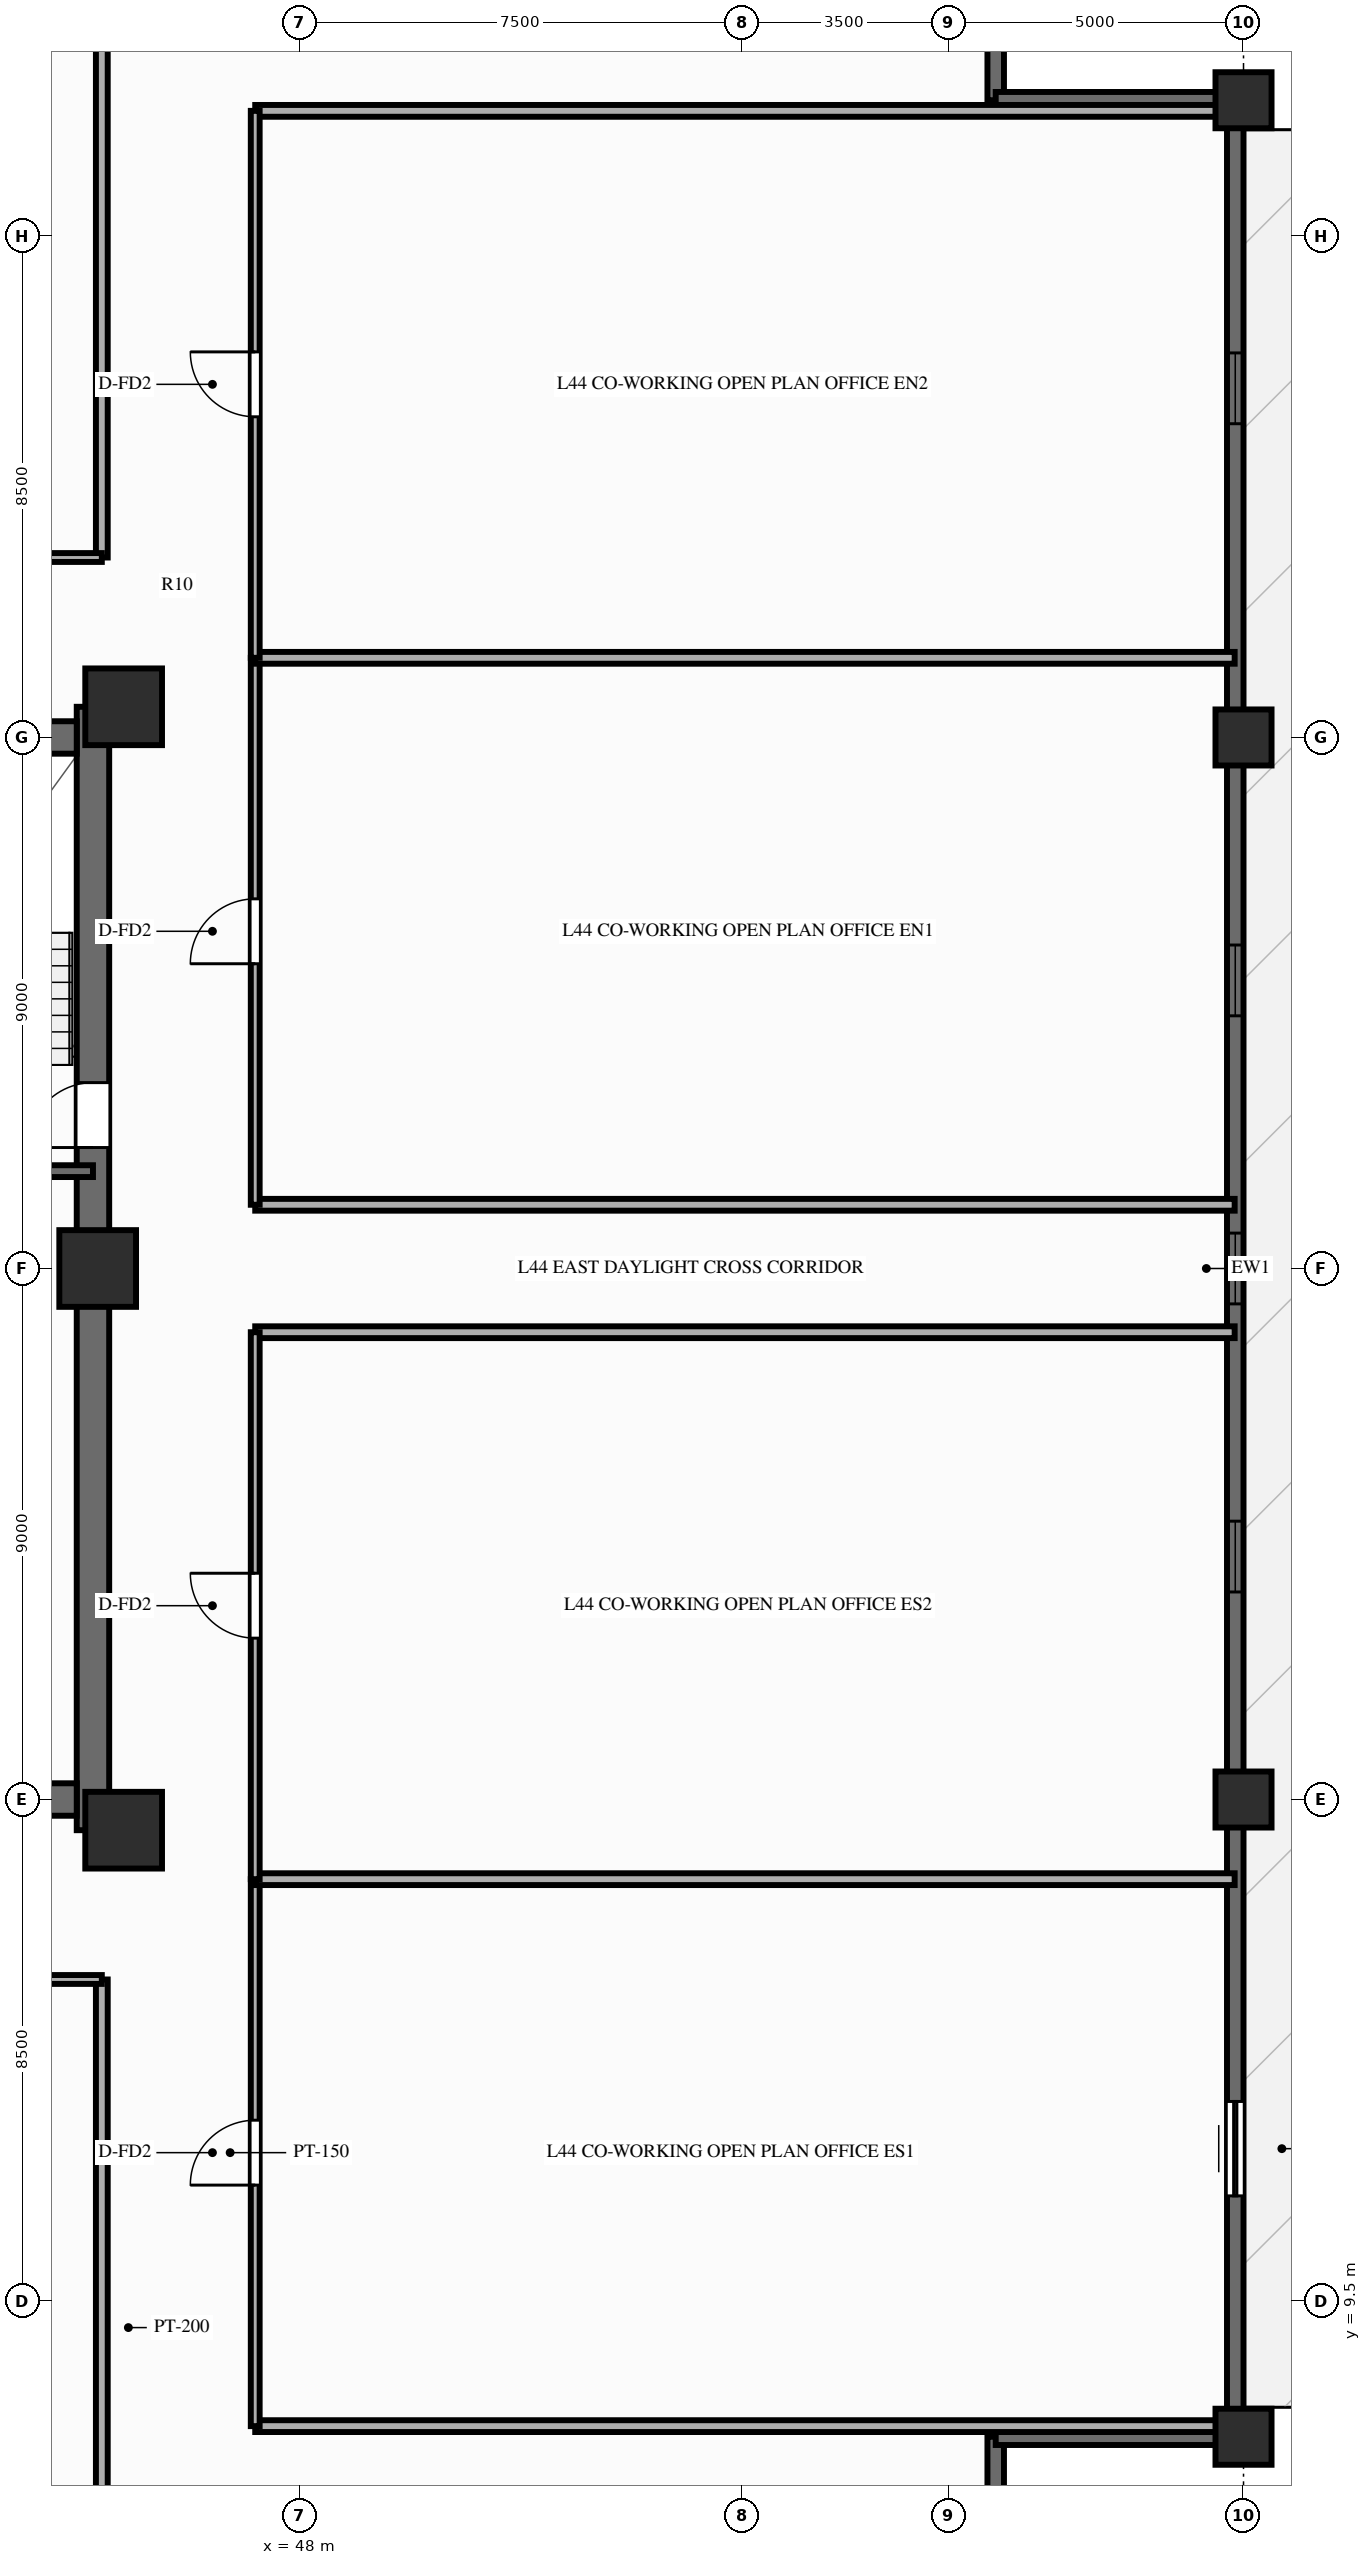
"""IFC4 building model, lengths in metres.
Left out: names, types, materials, properties, quantities, classifications, styles, units other than length and angle.
Written with IfcOpenShell. Run it as: python <this file> out.ifc"""

import sys

from ifc_helpers import new_model, si_unit, direction, frame, frame_2d, origin, origin_2d, place, context, subcontext, project, spatial, rectangle, extrude, source, transform, mapped, element, fill, save


model = new_model("IFC4")
c1 = context("Model", 3, precision=1e-05, world=origin(), true_north=direction((0.0, 1.0)))
c2 = subcontext(c1, "Body", "Model", "MODEL_VIEW")
j1 = project(units=[si_unit("LENGTHUNIT", "METRE"), si_unit("PLANEANGLEUNIT", "RADIAN")], contexts=[c1])
p1 = place(None, origin())
s1 = spatial("IfcSite", under=j1, at=p1, CompositionType="ELEMENT")
p2 = place(p1, origin())
s2 = spatial("IfcBuilding", under=s1, at=p2, CompositionType="ELEMENT")
p3 = place(p2, frame((0.0, 0.0, 138.75)))
s3 = spatial("IfcBuildingStorey", under=s2, at=p3, CompositionType="ELEMENT", Elevation=138.75)
p4 = place(p3, frame((44.5, 17.48, 0.0), z_axis=(0.0, 0.0, 1.0), x_axis=(0.0, 1.0, 0.0)))
e1 = element("IfcWall", 1, at=p4, inside=s3, PredefinedType="SHEAR", context=c2, shape_type="SweptSolid", body=[
    extrude(rectangle(XDim=19.04, YDim=0.55, at=frame_2d((9.52, 0.0))), origin(), (0.0, 0.0, 1.0), 3.0),
])
p5 = place(p4, frame((12.67, 0.0, 0.0), z_axis=(0.0, 0.0, 1.0), x_axis=(-1.0, 0.0, 0.0)))
e2 = element("IfcOpeningElement", 2, at=p5, cuts=e1, PredefinedType="OPENING", context=c2, shape_type="SweptSolid", body=[
    extrude(rectangle(XDim=1.1, YDim=2.15, at=frame_2d((0.55, 1.075))), frame((0.0, 0.287, 0.0), z_axis=(0.0, -1.0, 0.0), x_axis=(1.0, 0.0, 0.0)), (0.0, 0.0, 1.0), 0.574),
])
p6 = place(p3, frame((31.775, 18.0, 0.0), z_axis=(0.0, 0.0, 1.0), x_axis=(1.0, 0.0, 0.0)))
e3 = element("IfcWall", 3, at=p6, inside=s3, PredefinedType="SHEAR", context=c2, shape_type="SweptSolid", body=[
    extrude(rectangle(XDim=12.45, YDim=0.55, at=frame_2d((6.225, 0.0))), origin(), (0.0, 0.0, 1.0), 3.0),
])
p7 = place(p3, frame((31.775, 36.0, 0.0), z_axis=(0.0, 0.0, 1.0), x_axis=(1.0, 0.0, 0.0)))
e4 = element("IfcWall", 4, at=p7, inside=s3, PredefinedType="SHEAR", context=c2, shape_type="SweptSolid", body=[
    extrude(rectangle(XDim=12.45, YDim=0.55, at=frame_2d((6.225, 0.0))), origin(), (0.0, 0.0, 1.0), 3.0),
])
p8 = place(p7, frame((5.175, 0.0, 0.0), z_axis=(0.0, 0.0, 1.0), x_axis=(-1.0, 0.0, 0.0)))
e5 = element("IfcOpeningElement", 5, at=p8, cuts=e4, PredefinedType="OPENING", context=c2, shape_type="SweptSolid", body=[
    extrude(rectangle(XDim=1.4, YDim=2.15, at=frame_2d((0.7, 1.075))), frame((0.0, 0.287, 0.0), z_axis=(0.0, -1.0, 0.0), x_axis=(1.0, 0.0, 0.0)), (0.0, 0.0, 1.0), 0.574),
])
m1 = source(origin(), c2, "Body", "SweptSolid", [
    extrude(rectangle(XDim=1.3, YDim=1.3, at=origin_2d()), origin(), (0.0, 0.0, 1.0), 3.0),
])
for number, where, z_axis, x_axis in (
    (6, (45.02, 17.48, 0.0), (0.0, 0.0, 1.0), (1.0, 0.0, 0.0)),
    (7, (45.02, 36.52, 0.0), (0.0, 0.0, 1.0), (1.0, 0.0, 0.0)),
    (8, (44.58, 27.0, 0.0), (0.0, 0.0, 1.0), (1.0, 0.0, 0.0)),
):
    element("IfcColumn", number, at=place(p3, frame(where, z_axis=z_axis, x_axis=x_axis)), inside=s3, PredefinedType="COLUMN", context=c2, shape_type="MappedRepresentation", body=[
        mapped(m1, transform((0.0, 0.0, 0.0), scale=1.0)),
    ])
m2 = source(origin(), c2, "Body", "SweptSolid", [
    extrude(rectangle(XDim=0.95, YDim=0.95, at=origin_2d()), origin(), (0.0, 0.0, 1.0), 3.0),
])
for number, where, z_axis, x_axis in (
    (9, (64.0, 7.2, 0.0), (0.0, 0.0, 1.0), (1.0, 0.0, 0.0)),
    (10, (64.0, 18.0, 0.0), (0.0, 0.0, 1.0), (1.0, 0.0, 0.0)),
    (11, (64.0, 36.0, 0.0), (0.0, 0.0, 1.0), (1.0, 0.0, 0.0)),
    (12, (64.0, 46.8, 0.0), (0.0, 0.0, 1.0), (1.0, 0.0, 0.0)),
):
    element("IfcColumn", number, at=place(p3, frame(where, z_axis=z_axis, x_axis=x_axis)), inside=s3, PredefinedType="COLUMN", context=c2, shape_type="MappedRepresentation", body=[
        mapped(m2, transform((0.0, 0.0, 0.0), scale=1.0)),
    ])
p9 = place(p3, frame((63.86, 7.2, 0.0), z_axis=(0.0, 0.0, 1.0), x_axis=(0.0, 1.0, 0.0)))
e13 = element("IfcWall", 13, at=p9, inside=s3, PredefinedType="SOLIDWALL", context=c2, shape_type="SweptSolid", body=[
    extrude(rectangle(XDim=39.6, YDim=0.28, at=frame_2d((19.8, 0.0))), origin(), (0.0, 0.0, 1.0), 2.28),
])
p10 = place(p9, frame((5.683, 0.0, 0.0), z_axis=(0.0, 0.0, 1.0), x_axis=(-1.0, 0.0, 0.0)))
e14 = element("IfcOpeningElement", 14, at=p10, cuts=e13, PredefinedType="OPENING", context=c2, shape_type="SweptSolid", body=[
    extrude(rectangle(XDim=1.6, YDim=2.15, at=frame_2d((0.8, 1.075))), frame((0.0, 0.152, 0.0), z_axis=(0.0, -1.0, 0.0), x_axis=(1.0, 0.0, 0.0)), (0.0, 0.0, 1.0), 0.304),
])
p11 = place(p9, frame((14.317, 0.0, 0.25)))
e15 = element("IfcOpeningElement", 15, at=p11, cuts=e13, PredefinedType="OPENING", context=c2, shape_type="SweptSolid", body=[
    extrude(rectangle(XDim=1.2, YDim=1.5, at=frame_2d((0.6, 0.75))), frame((0.0, 0.152, 0.0), z_axis=(0.0, -1.0, 0.0), x_axis=(1.0, 0.0, 0.0)), (0.0, 0.0, 1.0), 0.304),
])
p12 = place(p9, frame((19.2, 0.0, 0.25)))
e16 = element("IfcOpeningElement", 16, at=p12, cuts=e13, PredefinedType="OPENING", context=c2, shape_type="SweptSolid", body=[
    extrude(rectangle(XDim=1.2, YDim=1.5, at=frame_2d((0.6, 0.75))), frame((0.0, 0.152, 0.0), z_axis=(0.0, -1.0, 0.0), x_axis=(1.0, 0.0, 0.0)), (0.0, 0.0, 1.0), 0.304),
])
p13 = place(p9, frame((24.083, 0.0, 0.25)))
e17 = element("IfcOpeningElement", 17, at=p13, cuts=e13, PredefinedType="OPENING", context=c2, shape_type="SweptSolid", body=[
    extrude(rectangle(XDim=1.2, YDim=1.5, at=frame_2d((0.6, 0.75))), frame((0.0, 0.152, 0.0), z_axis=(0.0, -1.0, 0.0), x_axis=(1.0, 0.0, 0.0)), (0.0, 0.0, 1.0), 0.304),
])
p14 = place(p9, frame((34.117, 0.0, 0.25)))
e18 = element("IfcOpeningElement", 18, at=p14, cuts=e13, PredefinedType="OPENING", context=c2, shape_type="SweptSolid", body=[
    extrude(rectangle(XDim=1.2, YDim=1.5, at=frame_2d((0.6, 0.75))), frame((0.0, 0.152, 0.0), z_axis=(0.0, -1.0, 0.0), x_axis=(1.0, 0.0, 0.0)), (0.0, 0.0, 1.0), 0.304),
])
for number, where, z_axis, x_axis in (
    (19, (59.8, 3.08, 0.0), (0.0, 0.0, 1.0), (0.0, 1.0, 0.0)),
    (20, (59.8, 7.2, 0.0), (0.0, 0.0, 1.0), (1.0, 0.0, 0.0)),
    (21, (59.8, 46.8, 0.0), (0.0, 0.0, 1.0), (0.0, 1.0, 0.0)),
    (22, (59.8, 46.8, 0.0), (0.0, 0.0, 1.0), (1.0, 0.0, 0.0)),
):
    element("IfcWall", number, at=place(p3, frame(where, z_axis=z_axis, x_axis=x_axis)), inside=s3, PredefinedType="SOLIDWALL", context=c2, shape_type="SweptSolid", body=[
        extrude(rectangle(XDim=4.12, YDim=0.28, at=frame_2d((2.06, 0.0))), origin(), (0.0, 0.0, 1.0), 2.28),
    ])
p15 = place(p3, frame((40.57, 28.65, 0.0), z_axis=(0.0, 0.0, 1.0), x_axis=(1.0, 0.0, 0.0)))
e23 = element("IfcWall", 23, at=p15, inside=s3, PredefinedType="SOLIDWALL", context=c2, shape_type="SweptSolid", body=[
    extrude(rectangle(XDim=3.93, YDim=0.2, at=frame_2d((1.965, 0.0))), origin(), (0.0, 0.0, 1.0), 2.79),
])
p16 = place(p3, frame((44.65, 14.95, 0.0), z_axis=(0.0, 0.0, 1.0), x_axis=(0.0, -1.0, 0.0)))
e24 = element("IfcWall", 24, at=p16, inside=s3, PredefinedType="PARTITIONING", context=c2, shape_type="SweptSolid", body=[
    extrude(rectangle(XDim=11.8, YDim=0.2, at=frame_2d((5.9, 0.0))), origin(), (0.0, 0.0, 1.0), 2.34),
])
p17 = place(p3, frame((36.25, 14.95, 0.0), z_axis=(0.0, 0.0, 1.0), x_axis=(1.0, 0.0, 0.0)))
e25 = element("IfcWall", 25, at=p17, inside=s3, PredefinedType="PARTITIONING", context=c2, shape_type="SweptSolid", body=[
    extrude(rectangle(XDim=8.4, YDim=0.15, at=frame_2d((4.2, 0.0))), origin(), (0.0, 0.0, 1.0), 2.79),
])
p18 = place(p17, frame((3.367, 0.0, 0.0)))
e26 = element("IfcOpeningElement", 26, at=p18, cuts=e25, PredefinedType="OPENING", context=c2, shape_type="SweptSolid", body=[
    extrude(rectangle(XDim=1.1, YDim=2.15, at=frame_2d((0.55, 1.075))), frame((0.0, 0.087, 0.0), z_axis=(0.0, -1.0, 0.0), x_axis=(1.0, 0.0, 0.0)), (0.0, 0.0, 1.0), 0.174),
])
p19 = place(p3, frame((44.65, 39.05, 0.0), z_axis=(0.0, 0.0, 1.0), x_axis=(0.0, 1.0, 0.0)))
e27 = element("IfcWall", 27, at=p19, inside=s3, PredefinedType="PARTITIONING", context=c2, shape_type="SweptSolid", body=[
    extrude(rectangle(XDim=11.8, YDim=0.2, at=frame_2d((5.9, 0.0))), origin(), (0.0, 0.0, 1.0), 2.34),
])
p20 = place(p3, frame((38.629, 39.05, 0.0), z_axis=(0.0, 0.0, 1.0), x_axis=(1.0, 0.0, 0.0)))
e28 = element("IfcWall", 28, at=p20, inside=s3, PredefinedType="PARTITIONING", context=c2, shape_type="SweptSolid", body=[
    extrude(rectangle(XDim=6.021, YDim=0.15, at=frame_2d((3.01, 0.0))), origin(), (0.0, 0.0, 1.0), 2.79),
])
p21 = place(p20, frame((2.46, 0.0, 0.0)))
e29 = element("IfcOpeningElement", 29, at=p21, cuts=e28, PredefinedType="OPENING", context=c2, shape_type="SweptSolid", body=[
    extrude(rectangle(XDim=1.1, YDim=2.15, at=frame_2d((0.55, 1.075))), frame((0.0, 0.087, 0.0), z_axis=(0.0, -1.0, 0.0), x_axis=(1.0, 0.0, 0.0)), (0.0, 0.0, 1.0), 0.174),
])
for number, where, z_axis, x_axis in (
    (30, (47.25, 7.38, 0.0), (0.0, 0.0, 1.0), (1.0, 0.0, 0.0)),
    (31, (47.25, 25.92, 0.0), (0.0, 0.0, 1.0), (1.0, 0.0, 0.0)),
):
    element("IfcWall", number, at=place(p3, frame(where, z_axis=z_axis, x_axis=x_axis)), inside=s3, PredefinedType="PARTITIONING", context=c2, shape_type="SweptSolid", body=[
        extrude(rectangle(XDim=16.6, YDim=0.2, at=frame_2d((8.3, 0.0))), origin(), (0.0, 0.0, 1.0), 2.79),
    ])
p22 = place(p3, frame((47.25, 7.38, 0.0), z_axis=(0.0, 0.0, 1.0), x_axis=(0.0, 1.0, 0.0)))
e32 = element("IfcWall", 32, at=p22, inside=s3, PredefinedType="PARTITIONING", context=c2, shape_type="SweptSolid", body=[
    extrude(rectangle(XDim=9.27, YDim=0.15, at=frame_2d((4.635, 0.0))), origin(), (0.0, 0.0, 1.0), 2.79),
])
p23 = place(p22, frame((4.085, 0.0, 0.0)))
e33 = element("IfcOpeningElement", 33, at=p23, cuts=e32, PredefinedType="OPENING", context=c2, shape_type="SweptSolid", body=[
    extrude(rectangle(XDim=1.1, YDim=2.15, at=frame_2d((0.55, 1.075))), frame((0.0, 0.087, 0.0), z_axis=(0.0, -1.0, 0.0), x_axis=(1.0, 0.0, 0.0)), (0.0, 0.0, 1.0), 0.174),
])
p24 = place(p3, frame((47.25, 16.65, 0.0), z_axis=(0.0, 0.0, 1.0), x_axis=(1.0, 0.0, 0.0)))
e34 = element("IfcWall", 34, at=p24, inside=s3, PredefinedType="PARTITIONING", context=c2, shape_type="SweptSolid", body=[
    extrude(rectangle(XDim=16.6, YDim=0.2, at=frame_2d((8.3, 0.0))), origin(), (0.0, 0.0, 1.0), 2.79),
])
p25 = place(p3, frame((47.25, 16.65, 0.0), z_axis=(0.0, 0.0, 1.0), x_axis=(0.0, 1.0, 0.0)))
e35 = element("IfcWall", 35, at=p25, inside=s3, PredefinedType="PARTITIONING", context=c2, shape_type="SweptSolid", body=[
    extrude(rectangle(XDim=9.27, YDim=0.15, at=frame_2d((4.635, 0.0))), origin(), (0.0, 0.0, 1.0), 2.79),
])
p26 = place(p25, frame((4.085, 0.0, 0.0)))
e36 = element("IfcOpeningElement", 36, at=p26, cuts=e35, PredefinedType="OPENING", context=c2, shape_type="SweptSolid", body=[
    extrude(rectangle(XDim=1.1, YDim=2.15, at=frame_2d((0.55, 1.075))), frame((0.0, 0.087, 0.0), z_axis=(0.0, -1.0, 0.0), x_axis=(1.0, 0.0, 0.0)), (0.0, 0.0, 1.0), 0.174),
])
for number, where, z_axis, x_axis in (
    (37, (47.25, 28.08, 0.0), (0.0, 0.0, 1.0), (1.0, 0.0, 0.0)),
    (38, (47.25, 46.62, 0.0), (0.0, 0.0, 1.0), (1.0, 0.0, 0.0)),
):
    element("IfcWall", number, at=place(p3, frame(where, z_axis=z_axis, x_axis=x_axis)), inside=s3, PredefinedType="PARTITIONING", context=c2, shape_type="SweptSolid", body=[
        extrude(rectangle(XDim=16.6, YDim=0.2, at=frame_2d((8.3, 0.0))), origin(), (0.0, 0.0, 1.0), 2.79),
    ])
p27 = place(p3, frame((47.25, 28.08, 0.0), z_axis=(0.0, 0.0, 1.0), x_axis=(0.0, 1.0, 0.0)))
e39 = element("IfcWall", 39, at=p27, inside=s3, PredefinedType="PARTITIONING", context=c2, shape_type="SweptSolid", body=[
    extrude(rectangle(XDim=9.27, YDim=0.15, at=frame_2d((4.635, 0.0))), origin(), (0.0, 0.0, 1.0), 2.79),
])
p28 = place(p27, frame((4.085, 0.0, 0.0)))
e40 = element("IfcOpeningElement", 40, at=p28, cuts=e39, PredefinedType="OPENING", context=c2, shape_type="SweptSolid", body=[
    extrude(rectangle(XDim=1.1, YDim=2.15, at=frame_2d((0.55, 1.075))), frame((0.0, 0.087, 0.0), z_axis=(0.0, -1.0, 0.0), x_axis=(1.0, 0.0, 0.0)), (0.0, 0.0, 1.0), 0.174),
])
p29 = place(p3, frame((47.25, 37.35, 0.0), z_axis=(0.0, 0.0, 1.0), x_axis=(1.0, 0.0, 0.0)))
e41 = element("IfcWall", 41, at=p29, inside=s3, PredefinedType="PARTITIONING", context=c2, shape_type="SweptSolid", body=[
    extrude(rectangle(XDim=16.6, YDim=0.2, at=frame_2d((8.3, 0.0))), origin(), (0.0, 0.0, 1.0), 2.79),
])
p30 = place(p3, frame((47.25, 37.35, 0.0), z_axis=(0.0, 0.0, 1.0), x_axis=(0.0, 1.0, 0.0)))
e42 = element("IfcWall", 42, at=p30, inside=s3, PredefinedType="PARTITIONING", context=c2, shape_type="SweptSolid", body=[
    extrude(rectangle(XDim=9.27, YDim=0.15, at=frame_2d((4.635, 0.0))), origin(), (0.0, 0.0, 1.0), 2.79),
])
p31 = place(p30, frame((4.085, 0.0, 0.0)))
e43 = element("IfcOpeningElement", 43, at=p31, cuts=e42, PredefinedType="OPENING", context=c2, shape_type="SweptSolid", body=[
    extrude(rectangle(XDim=1.1, YDim=2.15, at=frame_2d((0.55, 1.075))), frame((0.0, 0.087, 0.0), z_axis=(0.0, -1.0, 0.0), x_axis=(1.0, 0.0, 0.0)), (0.0, 0.0, 1.0), 0.174),
])
m3 = source(origin(), c2, "Body", "SweptSolid", [
    extrude(rectangle(XDim=1.6, YDim=2.15, at=frame_2d((0.8, 1.075))), frame((0.0, 0.025, 0.0), z_axis=(0.0, -1.0, 0.0), x_axis=(1.0, 0.0, 0.0)), (0.0, 0.0, 1.0), 0.05),
])
p32 = place(p10, origin())
e44 = element("IfcDoor", 44, at=p32, inside=s3, OperationType="SLIDING_TO_LEFT", PredefinedType="DOOR", context=c2, shape_type="MappedRepresentation", body=[
    mapped(m3, transform((0.0, 0.0, 0.0), scale=1.0)),
])
fill(e14, e44)
m4 = source(origin(), c2, "Body", "SweptSolid", [
    extrude(rectangle(XDim=1.2, YDim=1.5, at=frame_2d((0.6, 0.75))), frame((0.0, 0.03, 0.0), z_axis=(0.0, -1.0, 0.0), x_axis=(1.0, 0.0, 0.0)), (0.0, 0.0, 1.0), 0.06),
])
p33 = place(p11, origin())
e45 = element("IfcWindow", 45, at=p33, inside=s3, PartitioningType="SINGLE_PANEL", PredefinedType="WINDOW", context=c2, shape_type="MappedRepresentation", body=[
    mapped(m4, transform((0.0, 0.0, 0.0), scale=1.0)),
])
fill(e15, e45)
p34 = place(p12, origin())
e46 = element("IfcWindow", 46, at=p34, inside=s3, PartitioningType="SINGLE_PANEL", PredefinedType="WINDOW", context=c2, shape_type="MappedRepresentation", body=[
    mapped(m4, transform((0.0, 0.0, 0.0), scale=1.0)),
])
fill(e16, e46)
p35 = place(p13, origin())
e47 = element("IfcWindow", 47, at=p35, inside=s3, PartitioningType="SINGLE_PANEL", PredefinedType="WINDOW", context=c2, shape_type="MappedRepresentation", body=[
    mapped(m4, transform((0.0, 0.0, 0.0), scale=1.0)),
])
fill(e17, e47)
p36 = place(p14, origin())
e48 = element("IfcWindow", 48, at=p36, inside=s3, PartitioningType="SINGLE_PANEL", PredefinedType="WINDOW", context=c2, shape_type="MappedRepresentation", body=[
    mapped(m4, transform((0.0, 0.0, 0.0), scale=1.0)),
])
fill(e18, e48)
m5 = source(origin(), c2, "Body", "SweptSolid", [
    extrude(rectangle(XDim=1.1, YDim=2.15, at=frame_2d((0.55, 1.075))), frame((0.0, 0.025, 0.0), z_axis=(0.0, -1.0, 0.0), x_axis=(1.0, 0.0, 0.0)), (0.0, 0.0, 1.0), 0.05),
])
p37 = place(p5, origin())
e49 = element("IfcDoor", 49, at=p37, inside=s3, OperationType="SINGLE_SWING_RIGHT", PredefinedType="DOOR", context=c2, shape_type="MappedRepresentation", body=[
    mapped(m5, transform((0.0, 0.0, 0.0), scale=1.0)),
])
fill(e2, e49)
p38 = place(p23, origin())
e50 = element("IfcDoor", 50, at=p38, inside=s3, OperationType="SINGLE_SWING_LEFT", PredefinedType="DOOR", context=c2, shape_type="MappedRepresentation", body=[
    mapped(m5, transform((0.0, 0.0, 0.0), scale=1.0)),
])
fill(e33, e50)
p39 = place(p26, origin())
e51 = element("IfcDoor", 51, at=p39, inside=s3, OperationType="SINGLE_SWING_RIGHT", PredefinedType="DOOR", context=c2, shape_type="MappedRepresentation", body=[
    mapped(m5, transform((0.0, 0.0, 0.0), scale=1.0)),
])
fill(e36, e51)
p40 = place(p28, origin())
e52 = element("IfcDoor", 52, at=p40, inside=s3, OperationType="SINGLE_SWING_LEFT", PredefinedType="DOOR", context=c2, shape_type="MappedRepresentation", body=[
    mapped(m5, transform((0.0, 0.0, 0.0), scale=1.0)),
])
fill(e40, e52)
p41 = place(p31, origin())
e53 = element("IfcDoor", 53, at=p41, inside=s3, OperationType="SINGLE_SWING_RIGHT", PredefinedType="DOOR", context=c2, shape_type="MappedRepresentation", body=[
    mapped(m5, transform((0.0, 0.0, 0.0), scale=1.0)),
])
fill(e43, e53)
save(model, sys.argv[1])
